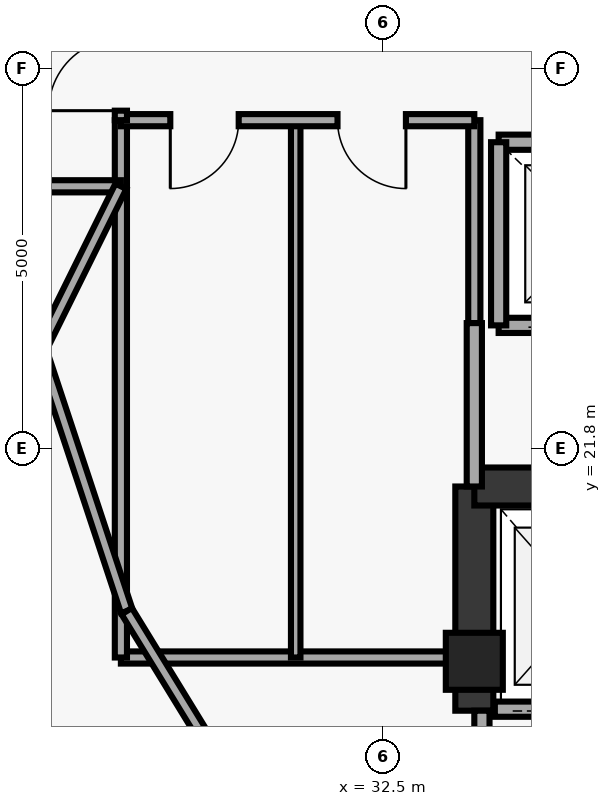
"""IFC4 building model, lengths in metres.
Left out: names, types, materials, properties, quantities, classifications, styles, units other than length and angle.
Written with IfcOpenShell. Run it as: python <this file> out.ifc"""

import sys

from ifc_helpers import new_model, si_unit, direction, frame, frame_2d, origin, origin_2d, place, context, subcontext, project, spatial, rectangle, extrude, element, fill, save


model = new_model("IFC4")
c1 = context("Model", 3, precision=1e-05, world=origin(), true_north=direction((0.0, 1.0)))
c2 = subcontext(c1, "Body", "Model", "MODEL_VIEW")
j1 = project(units=[si_unit("LENGTHUNIT", "METRE"), si_unit("PLANEANGLEUNIT", "RADIAN")], contexts=[c1])
p1 = place(None, origin())
s1 = spatial("IfcSite", under=j1, at=p1, CompositionType="ELEMENT")
p2 = place(p1, origin())
s2 = spatial("IfcBuilding", under=s1, at=p2, CompositionType="ELEMENT")
p3 = place(p2, frame((0.0, 0.0, 306.8)))
s3 = spatial("IfcBuildingStorey", under=s2, at=p3, CompositionType="ELEMENT", Elevation=306.8)
p4 = place(p3, frame((33.7, 19.0, 0.0), z_axis=(0.0, 0.0, 1.0), x_axis=(1.0, 0.0, 0.0)))
e1 = element("IfcColumn", 1, at=p4, inside=s3, PredefinedType="PILASTER", context=c2, shape_type="SweptSolid", body=[
    extrude(rectangle(XDim=0.75, YDim=0.75, at=origin_2d()), origin(), (0.0, 0.0, 1.0), 6.18),
])
p5 = place(p3, frame((33.7, 18.35, 0.0), z_axis=(0.0, 0.0, 1.0), x_axis=(0.0, 1.0, 0.0)))
e2 = element("IfcWall", 2, at=p5, inside=s3, PredefinedType="SHEAR", context=c2, shape_type="SweptSolid", body=[
    extrude(rectangle(XDim=2.95, YDim=0.5, at=frame_2d((1.475, 0.0))), origin(), (0.0, 0.0, 1.0), 6.18),
])
p6 = place(p3, frame((33.7, 21.3, 0.0), z_axis=(0.0, 0.0, 1.0), x_axis=(1.0, 0.0, 0.0)))
e3 = element("IfcWall", 3, at=p6, inside=s3, PredefinedType="SHEAR", context=c2, shape_type="SweptSolid", body=[
    extrude(rectangle(XDim=7.55, YDim=0.5, at=frame_2d((3.775, 0.0))), origin(), (0.0, 0.0, 1.0), 6.18),
])
p7 = place(p3, frame((34.02, 23.42, 0.0), z_axis=(0.0, 0.0, 1.0), x_axis=(1.0, 0.0, 0.0)))
e4 = element("IfcWall", 4, at=p7, inside=s3, PredefinedType="SOLIDWALL", context=c2, shape_type="SweptSolid", body=[
    extrude(rectangle(XDim=2.5, YDim=0.2, at=frame_2d((1.25, 0.0))), origin(), (0.0, 0.0, 1.0), 6.18),
])
p8 = place(p7, frame((0.7, 0.0, 0.0)))
e5 = element("IfcOpeningElement", 5, at=p8, cuts=e4, PredefinedType="OPENING", context=c2, shape_type="SweptSolid", body=[
    extrude(rectangle(XDim=1.1, YDim=2.15, at=frame_2d((0.55, 1.075))), frame((0.0, 0.11, 0.0), z_axis=(0.0, -1.0, 0.0), x_axis=(1.0, 0.0, 0.0)), (0.0, 0.0, 1.0), 0.22),
])
p9 = place(p3, frame((34.02, 25.83, 0.0), z_axis=(0.0, 0.0, 1.0), x_axis=(1.0, 0.0, 0.0)))
e6 = element("IfcWall", 6, at=p9, inside=s3, PredefinedType="SOLIDWALL", context=c2, shape_type="SweptSolid", body=[
    extrude(rectangle(XDim=2.5, YDim=0.2, at=frame_2d((1.25, 0.0))), origin(), (0.0, 0.0, 1.0), 6.18),
])
p10 = place(p3, frame((34.02, 23.42, 0.0), z_axis=(0.0, 0.0, 1.0), x_axis=(0.0, 1.0, 0.0)))
e7 = element("IfcWall", 7, at=p10, inside=s3, PredefinedType="SOLIDWALL", context=c2, shape_type="SweptSolid", body=[
    extrude(rectangle(XDim=2.41, YDim=0.2, at=frame_2d((1.205, 0.0))), origin(), (0.0, 0.0, 1.0), 6.18),
])
p11 = place(p3, frame((33.97, 18.37, 0.0), z_axis=(0.0, 0.0, 1.0), x_axis=(1.0, 0.0, 0.0)))
e8 = element("IfcWall", 8, at=p11, inside=s3, PredefinedType="SOLIDWALL", context=c2, shape_type="SweptSolid", body=[
    extrude(rectangle(XDim=2.36, YDim=0.2, at=frame_2d((1.18, 0.0))), origin(), (0.0, 0.0, 1.0), 6.18),
])
p12 = place(p11, frame((0.555, 0.0, 0.0)))
e9 = element("IfcOpeningElement", 9, at=p12, cuts=e8, PredefinedType="OPENING", context=c2, shape_type="SweptSolid", body=[
    extrude(rectangle(XDim=1.25, YDim=2.2, at=frame_2d((0.625, 1.1))), frame((0.0, 0.11, 0.0), z_axis=(0.0, -1.0, 0.0), x_axis=(1.0, 0.0, 0.0)), (0.0, 0.0, 1.0), 0.22),
])
p13 = place(p3, frame((29.05, 19.05, 0.0), z_axis=(0.0, 0.0, 1.0), x_axis=(1.0, 0.0, 0.0)))
e10 = element("IfcWall", 10, at=p13, inside=s3, PredefinedType="PARTITIONING", context=c2, shape_type="SweptSolid", body=[
    extrude(rectangle(XDim=4.65, YDim=0.16, at=frame_2d((2.325, 0.0))), origin(), (0.0, 0.0, 1.0), 6.18),
])
p14 = place(p3, frame((29.05, 19.05, 0.0), z_axis=(0.0, 0.0, 1.0), x_axis=(0.0, 1.0, 0.0)))
e11 = element("IfcWall", 11, at=p14, inside=s3, PredefinedType="PARTITIONING", context=c2, shape_type="SweptSolid", body=[
    extrude(rectangle(XDim=7.07, YDim=0.16, at=frame_2d((3.535, 0.0))), origin(), (0.0, 0.0, 1.0), 6.18),
])
p15 = place(p3, frame((33.7, 23.45, 0.0), z_axis=(0.0, 0.0, 1.0), x_axis=(0.0, 1.0, 0.0)))
e12 = element("IfcWall", 12, at=p15, inside=s3, PredefinedType="PARTITIONING", context=c2, shape_type="SweptSolid", body=[
    extrude(rectangle(XDim=2.67, YDim=0.16, at=frame_2d((1.335, 0.0))), origin(), (0.0, 0.0, 1.0), 6.18),
])
p16 = place(p3, frame((31.35, 19.05, 0.0), z_axis=(0.0, 0.0, 1.0), x_axis=(0.0, 1.0, 0.0)))
e13 = element("IfcWall", 13, at=p16, inside=s3, PredefinedType="PARTITIONING", context=c2, shape_type="SweptSolid", body=[
    extrude(rectangle(XDim=7.07, YDim=0.125, at=frame_2d((3.535, 0.0))), origin(), (0.0, 0.0, 1.0), 6.18),
])
p17 = place(p3, frame((33.7, 26.12, 0.0), z_axis=(0.0, 0.0, 1.0), x_axis=(-1.0, 0.0, 0.0)))
e14 = element("IfcWall", 14, at=p17, inside=s3, PredefinedType="PARTITIONING", context=c2, shape_type="SweptSolid", body=[
    extrude(rectangle(XDim=4.65, YDim=0.16, at=frame_2d((2.325, 0.0))), origin(), (0.0, 0.0, 1.0), 6.18),
])
p18 = place(p17, frame((3.1, 0.0, 0.0)))
e15 = element("IfcOpeningElement", 15, at=p18, cuts=e14, PredefinedType="OPENING", context=c2, shape_type="SweptSolid", body=[
    extrude(rectangle(XDim=0.9, YDim=2.1, at=frame_2d((0.45, 1.05))), frame((0.0, 0.09, 0.0), z_axis=(0.0, -1.0, 0.0), x_axis=(1.0, 0.0, 0.0)), (0.0, 0.0, 1.0), 0.18),
])
p19 = place(p17, frame((0.9, 0.0, 0.0)))
e16 = element("IfcOpeningElement", 16, at=p19, cuts=e14, PredefinedType="OPENING", context=c2, shape_type="SweptSolid", body=[
    extrude(rectangle(XDim=0.9, YDim=2.1, at=frame_2d((0.45, 1.05))), frame((0.0, 0.09, 0.0), z_axis=(0.0, -1.0, 0.0), x_axis=(1.0, 0.0, 0.0)), (0.0, 0.0, 1.0), 0.18),
])
p20 = place(p3, frame((33.7, 21.3, 0.0), z_axis=(0.0, 0.0, 1.0), x_axis=(0.0, 1.0, 0.0)))
e17 = element("IfcWall", 17, at=p20, inside=s3, PredefinedType="SOLIDWALL", context=c2, shape_type="SweptSolid", body=[
    extrude(rectangle(XDim=2.15, YDim=0.2, at=frame_2d((1.075, 0.0))), origin(), (0.0, 0.0, 1.0), 6.18),
])
p21 = place(p3, frame((33.8, 15.55, 0.0), z_axis=(0.0, 0.0, 1.0), x_axis=(0.0, 1.0, 0.0)))
e18 = element("IfcWall", 18, at=p21, inside=s3, PredefinedType="SOLIDWALL", context=c2, shape_type="SweptSolid", body=[
    extrude(rectangle(XDim=2.8, YDim=0.2, at=frame_2d((1.4, 0.0))), origin(), (0.0, 0.0, 1.0), 6.18),
])
p22 = place(p3, frame((29.05, 26.12, 0.0), z_axis=(0.0, 0.0, 1.0), x_axis=(0.0, 1.0, 0.0)))
e19 = element("IfcWall", 19, at=p22, inside=s3, PredefinedType="PARTITIONING", context=c2, shape_type="SweptSolid", body=[
    extrude(rectangle(XDim=1.2, YDim=0.16, at=frame_2d((0.6, 0.0))), origin(), (0.0, 0.0, 1.0), 6.18),
])
p23 = place(p22, frame((0.125, 0.0, 0.0)))
e20 = element("IfcOpeningElement", 20, at=p23, cuts=e19, PredefinedType="OPENING", context=c2, shape_type="SweptSolid", body=[
    extrude(rectangle(XDim=0.95, YDim=2.15, at=frame_2d((0.475, 1.075))), frame((0.0, 0.09, 0.0), z_axis=(0.0, -1.0, 0.0), x_axis=(1.0, 0.0, 0.0)), (0.0, 0.0, 1.0), 0.18),
])
p24 = place(p3, frame((27.988, 23.104, 0.0), z_axis=(0.0, 0.0, 1.0), x_axis=(0.313965508334, -0.949434389295, 0.0)))
e21 = element("IfcWall", 21, at=p24, inside=s3, PredefinedType="PARTITIONING", context=c2, shape_type="SweptSolid", body=[
    extrude(rectangle(XDim=3.627, YDim=0.16, at=frame_2d((1.814, 0.0))), origin(), (0.0, 0.0, 1.0), 6.18),
])
p25 = place(p3, frame((29.127, 19.66, 0.0), z_axis=(0.0, 0.0, 1.0), x_axis=(0.522486120877, -0.852647789823, 0.0)))
e22 = element("IfcWall", 22, at=p25, inside=s3, PredefinedType="PARTITIONING", context=c2, shape_type="SweptSolid", body=[
    extrude(rectangle(XDim=3.468, YDim=0.16, at=frame_2d((1.734, 0.0))), origin(), (0.0, 0.0, 1.0), 6.18),
])
p26 = place(p3, frame((26.25, 25.25, 0.0), z_axis=(0.0, 0.0, 1.0), x_axis=(1.0, 0.0, 0.0)))
e23 = element("IfcWall", 23, at=p26, inside=s3, PredefinedType="PARTITIONING", context=c2, shape_type="SweptSolid", body=[
    extrude(rectangle(XDim=2.8, YDim=0.16, at=frame_2d((1.4, 0.0))), origin(), (0.0, 0.0, 1.0), 6.18),
])
p27 = place(p26, frame((0.2, 0.0, 0.0)))
e24 = element("IfcOpeningElement", 24, at=p27, cuts=e23, PredefinedType="OPENING", context=c2, shape_type="SweptSolid", body=[
    extrude(rectangle(XDim=1.6, YDim=2.2, at=frame_2d((0.8, 1.1))), frame((0.0, 0.09, 0.0), z_axis=(0.0, -1.0, 0.0), x_axis=(1.0, 0.0, 0.0)), (0.0, 0.0, 1.0), 0.18),
])
p28 = place(p3, frame((27.988, 23.104, 0.0), z_axis=(0.0, 0.0, 1.0), x_axis=(0.443539160525, 0.896254993337, 0.0)))
e25 = element("IfcWall", 25, at=p28, inside=s3, PredefinedType="PARTITIONING", context=c2, shape_type="SweptSolid", body=[
    extrude(rectangle(XDim=2.394, YDim=0.16, at=frame_2d((1.197, 0.0))), origin(), (0.0, 0.0, 1.0), 6.18),
])
p29 = place(p18, origin())
e26 = element("IfcDoor", 26, at=p29, inside=s3, OperationType="SINGLE_SWING_RIGHT", PredefinedType="DOOR", context=c2, shape_type="SweptSolid", body=[
    extrude(rectangle(XDim=0.9, YDim=2.1, at=frame_2d((0.45, 1.05))), frame((0.0, 0.025, 0.0), z_axis=(0.0, -1.0, 0.0), x_axis=(1.0, 0.0, 0.0)), (0.0, 0.0, 1.0), 0.05),
])
fill(e15, e26)
p30 = place(p19, origin())
e27 = element("IfcDoor", 27, at=p30, inside=s3, OperationType="SINGLE_SWING_LEFT", PredefinedType="DOOR", context=c2, shape_type="SweptSolid", body=[
    extrude(rectangle(XDim=0.9, YDim=2.1, at=frame_2d((0.45, 1.05))), frame((0.0, 0.025, 0.0), z_axis=(0.0, -1.0, 0.0), x_axis=(1.0, 0.0, 0.0)), (0.0, 0.0, 1.0), 0.05),
])
fill(e16, e27)
p31 = place(p23, origin())
e28 = element("IfcDoor", 28, at=p31, inside=s3, OperationType="SINGLE_SWING_RIGHT", PredefinedType="DOOR", context=c2, shape_type="SweptSolid", body=[
    extrude(rectangle(XDim=0.95, YDim=2.15, at=frame_2d((0.475, 1.075))), frame((0.0, 0.025, 0.0), z_axis=(0.0, -1.0, 0.0), x_axis=(1.0, 0.0, 0.0)), (0.0, 0.0, 1.0), 0.05),
])
fill(e20, e28)
save(model, sys.argv[1])
